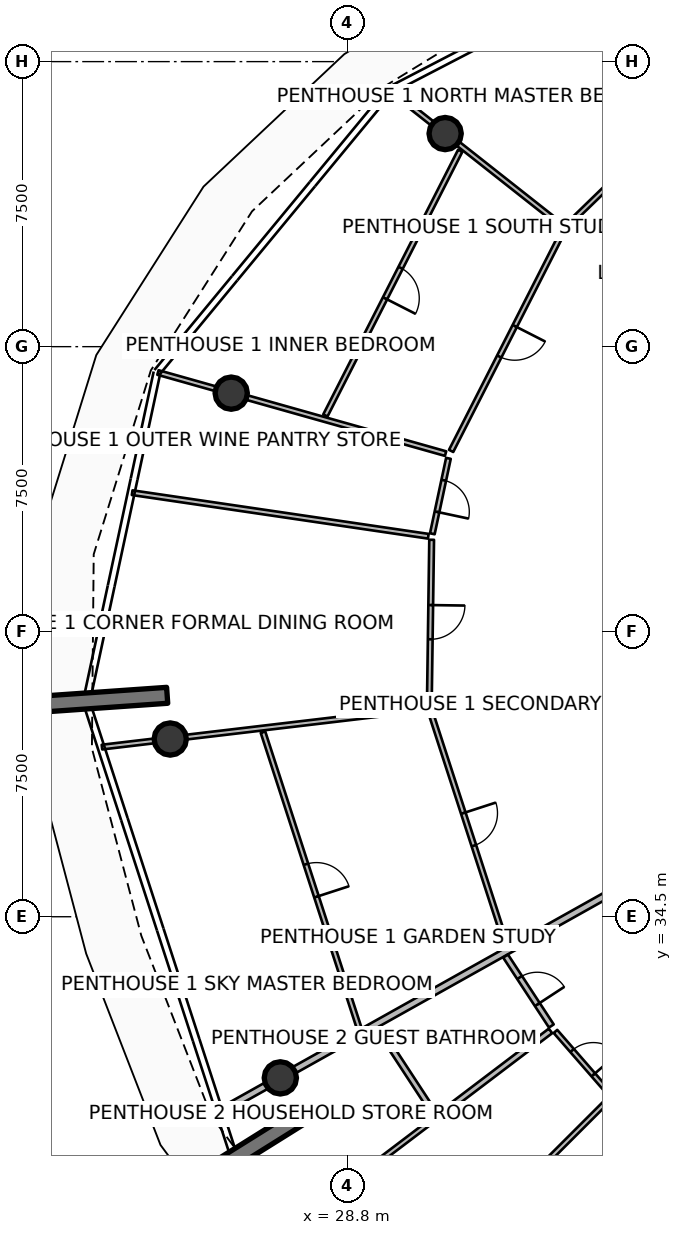
"""IFC4 building model, lengths in metres.
Left out: names, types, materials, properties, quantities, classifications, styles, units other than length and angle.
Written with IfcOpenShell. Run it as: python <this file> out.ifc"""

import sys

from ifc_helpers import new_model, si_unit, direction, frame, frame_2d, origin, origin_2d, place, context, subcontext, project, spatial, rectangle, circle, extrude, element, fill, save


model = new_model("IFC4")
c1 = context("Model", 3, precision=1e-05, world=origin(), true_north=direction((0.0, 1.0)))
c2 = subcontext(c1, "Body", "Model", "MODEL_VIEW")
j1 = project(units=[si_unit("LENGTHUNIT", "METRE"), si_unit("PLANEANGLEUNIT", "RADIAN")], contexts=[c1])
p1 = place(None, origin())
s1 = spatial("IfcSite", under=j1, at=p1, CompositionType="ELEMENT")
p2 = place(p1, origin())
s2 = spatial("IfcBuilding", under=s1, at=p2, CompositionType="ELEMENT")
p3 = place(p2, frame((0.0, 0.0, 313.7)))
s3 = spatial("IfcBuildingStorey", under=s2, at=p3, CompositionType="ELEMENT", Elevation=313.7)
for number, where, z_axis, x_axis in (
    (1, (24.059, 40.326, 0.0), (0.0, 0.0, 1.0), (-0.998, -0.07, 0.0)),
    (2, (27.647, 29.282, 0.0), (0.0, 0.0, 1.0), (-0.848, -0.53, 0.0)),
):
    element("IfcWall", number, at=place(p3, frame(where, z_axis=z_axis, x_axis=x_axis)), inside=s3, PredefinedType="SOLIDWALL", context=c2, shape_type="SweptSolid", body=[
        extrude(rectangle(XDim=3.5, YDim=0.42, at=frame_2d((1.75, 0.0))), origin(), (0.0, 0.0, 1.0), 4.2),
    ])
for number, where, z_axis, x_axis in (
    (3, (31.374, 55.107, 0.0), (0.0, 0.0, 1.0), (1.0, 0.0, 0.0)),
    (4, (25.744, 48.277, 0.0), (0.0, 0.0, 1.0), (1.0, 0.0, 0.0)),
    (5, (24.14, 39.176, 0.0), (0.0, 0.0, 1.0), (1.0, 0.0, 0.0)),
    (6, (27.037, 30.26, 0.0), (0.0, 0.0, 1.0), (1.0, 0.0, 0.0)),
):
    element("IfcColumn", number, at=place(p3, frame(where, z_axis=z_axis, x_axis=x_axis)), inside=s3, PredefinedType="COLUMN", context=c2, shape_type="SweptSolid", body=[
        extrude(circle(Radius=0.425, at=origin_2d()), origin(), (0.0, 0.0, 1.0), 3.94),
    ])
p4 = place(p3, frame((37.204, 35.954, 0.0), z_axis=(0.0, 0.0, 1.0), x_axis=(-0.872495191914, -0.488622697064, 0.0)))
e7 = element("IfcWall", 7, at=p4, inside=s3, PredefinedType="PARTITIONING", context=c2, shape_type="SweptSolid", body=[
    extrude(rectangle(XDim=13.462, YDim=0.18, at=frame_2d((6.731, 0.0))), origin(), (0.0, 0.0, 1.0), 3.38),
])
p5 = place(p3, frame((37.739, 55.87, 0.0), z_axis=(0.0, 0.0, 1.0), x_axis=(-0.594773749171, 0.803893144203, 0.0)))
e8 = element("IfcWall", 8, at=p5, inside=s3, PredefinedType="PARTITIONING", context=c2, shape_type="SweptSolid", body=[
    extrude(rectangle(XDim=3.964, YDim=0.15, at=frame_2d((1.982, 0.0))), origin(), (0.0, 0.0, 1.0), 3.38),
])
p6 = place(p3, frame((37.728, 55.735, 0.0), z_axis=(0.0, 0.0, 1.0), x_axis=(-0.717843655189, -0.696204342636, 0.0)))
e9 = element("IfcWall", 9, at=p6, inside=s3, PredefinedType="PARTITIONING", context=c2, shape_type="SweptSolid", body=[
    extrude(rectangle(XDim=4.366, YDim=0.125, at=frame_2d((2.183, 0.0))), origin(), (0.0, 0.0, 1.0), 3.38),
])
p7 = place(p6, frame((1.733, 0.0, 0.0)))
e10 = element("IfcOpeningElement", 10, at=p7, cuts=e9, PredefinedType="OPENING", context=c2, shape_type="SweptSolid", body=[
    extrude(rectangle(XDim=0.9, YDim=2.08, at=frame_2d((0.45, 1.04))), frame((0.0, 0.073, 0.0), z_axis=(0.0, -1.0, 0.0), x_axis=(1.0, 0.0, 0.0)), (0.0, 0.0, 1.0), 0.145),
])
p8 = place(p3, frame((34.443, 52.688, 0.0), z_axis=(0.0, 0.0, 1.0), x_axis=(-0.785329715116, 0.61907773224, 0.0)))
e11 = element("IfcWall", 11, at=p8, inside=s3, PredefinedType="PARTITIONING", context=c2, shape_type="SweptSolid", body=[
    extrude(rectangle(XDim=5.73, YDim=0.125, at=frame_2d((2.865, 0.0))), origin(), (0.0, 0.0, 1.0), 3.38),
])
p9 = place(p3, frame((34.472, 52.528, 0.0), z_axis=(0.0, 0.0, 1.0), x_axis=(-0.453985634683, -0.891009003042, 0.0)))
e12 = element("IfcWall", 12, at=p9, inside=s3, PredefinedType="PARTITIONING", context=c2, shape_type="SweptSolid", body=[
    extrude(rectangle(XDim=6.477, YDim=0.125, at=frame_2d((3.238, 0.0))), origin(), (0.0, 0.0, 1.0), 3.38),
])
p10 = place(p9, frame((2.788, 0.0, 0.0)))
e13 = element("IfcOpeningElement", 13, at=p10, cuts=e12, PredefinedType="OPENING", context=c2, shape_type="SweptSolid", body=[
    extrude(rectangle(XDim=0.9, YDim=2.08, at=frame_2d((0.45, 1.04))), frame((0.0, 0.073, 0.0), z_axis=(0.0, -1.0, 0.0), x_axis=(1.0, 0.0, 0.0)), (0.0, 0.0, 1.0), 0.145),
])
p11 = place(p3, frame((31.772, 54.656, 0.0), z_axis=(0.0, 0.0, 1.0), x_axis=(-0.453983318952, -0.891010182946, 0.0)))
e14 = element("IfcWall", 14, at=p11, inside=s3, PredefinedType="PARTITIONING", context=c2, shape_type="SweptSolid", body=[
    extrude(rectangle(XDim=7.818, YDim=0.125, at=frame_2d((3.909, 0.0))), origin(), (0.0, 0.0, 1.0), 3.38),
])
p12 = place(p11, frame((3.459, 0.0, 0.0)))
e15 = element("IfcOpeningElement", 15, at=p12, cuts=e14, PredefinedType="OPENING", context=c2, shape_type="SweptSolid", body=[
    extrude(rectangle(XDim=0.9, YDim=2.08, at=frame_2d((0.45, 1.04))), frame((0.0, 0.073, 0.0), z_axis=(0.0, -1.0, 0.0), x_axis=(1.0, 0.0, 0.0)), (0.0, 0.0, 1.0), 0.145),
])
p13 = place(p3, frame((31.385, 46.686, 0.0), z_axis=(0.0, 0.0, 1.0), x_axis=(-0.962456747036, 0.271435093685, 0.0)))
e16 = element("IfcWall", 16, at=p13, inside=s3, PredefinedType="PARTITIONING", context=c2, shape_type="SweptSolid", body=[
    extrude(rectangle(XDim=7.864, YDim=0.125, at=frame_2d((3.932, 0.0))), origin(), (0.0, 0.0, 1.0), 3.38),
])
p14 = place(p3, frame((30.931, 44.511, 0.0), z_axis=(0.0, 0.0, 1.0), x_axis=(-0.989350078836, 0.145555561584, 0.0)))
e17 = element("IfcWall", 17, at=p14, inside=s3, PredefinedType="PARTITIONING", context=c2, shape_type="SweptSolid", body=[
    extrude(rectangle(XDim=7.877, YDim=0.125, at=frame_2d((3.938, 0.0))), origin(), (0.0, 0.0, 1.0), 3.38),
])
p15 = place(p3, frame((31.46, 46.561, 0.0), z_axis=(0.0, 0.0, 1.0), x_axis=(-0.208871695371, -0.977943052981, 0.0)))
e18 = element("IfcWall", 18, at=p15, inside=s3, PredefinedType="PARTITIONING", context=c2, shape_type="SweptSolid", body=[
    extrude(rectangle(XDim=2.029, YDim=0.125, at=frame_2d((1.015, 0.0))), origin(), (0.0, 0.0, 1.0), 3.38),
])
p16 = place(p15, frame((0.59, 0.0, 0.0)))
e19 = element("IfcOpeningElement", 19, at=p16, cuts=e18, PredefinedType="OPENING", context=c2, shape_type="SweptSolid", body=[
    extrude(rectangle(XDim=0.85, YDim=2.06, at=frame_2d((0.425, 1.03))), frame((0.0, 0.073, 0.0), z_axis=(0.0, -1.0, 0.0), x_axis=(1.0, 0.0, 0.0)), (0.0, 0.0, 1.0), 0.145),
])
p17 = place(p3, frame((31.019, 44.418, 0.0), z_axis=(0.0, 0.0, 1.0), x_axis=(-0.014133062898, -0.999900123279, 0.0)))
e20 = element("IfcWall", 20, at=p17, inside=s3, PredefinedType="PARTITIONING", context=c2, shape_type="SweptSolid", body=[
    extrude(rectangle(XDim=4.336, YDim=0.125, at=frame_2d((2.168, 0.0))), origin(), (0.0, 0.0, 1.0), 3.38),
])
p18 = place(p17, frame((1.718, 0.0, 0.0)))
e21 = element("IfcOpeningElement", 21, at=p18, cuts=e20, PredefinedType="OPENING", context=c2, shape_type="SweptSolid", body=[
    extrude(rectangle(XDim=0.9, YDim=2.08, at=frame_2d((0.45, 1.04))), frame((0.0, 0.073, 0.0), z_axis=(0.0, -1.0, 0.0), x_axis=(1.0, 0.0, 0.0)), (0.0, 0.0, 1.0), 0.145),
])
p19 = place(p3, frame((30.857, 39.971, 0.0), z_axis=(0.0, 0.0, 1.0), x_axis=(-0.993069304007, -0.117530240533, 0.0)))
e22 = element("IfcWall", 22, at=p19, inside=s3, PredefinedType="PARTITIONING", context=c2, shape_type="SweptSolid", body=[
    extrude(rectangle(XDim=8.573, YDim=0.125, at=frame_2d((4.286, 0.0))), origin(), (0.0, 0.0, 1.0), 3.38),
])
p20 = place(p3, frame((30.99, 39.878, 0.0), z_axis=(0.0, 0.0, 1.0), x_axis=(0.309026406972, -0.951053457905, 0.0)))
e23 = element("IfcWall", 23, at=p20, inside=s3, PredefinedType="PARTITIONING", context=c2, shape_type="SweptSolid", body=[
    extrude(rectangle(XDim=6.477, YDim=0.125, at=frame_2d((3.238, 0.0))), origin(), (0.0, 0.0, 1.0), 3.38),
])
p21 = place(p20, frame((2.788, 0.0, 0.0)))
e24 = element("IfcOpeningElement", 24, at=p21, cuts=e23, PredefinedType="OPENING", context=c2, shape_type="SweptSolid", body=[
    extrude(rectangle(XDim=0.9, YDim=2.08, at=frame_2d((0.45, 1.04))), frame((0.0, 0.073, 0.0), z_axis=(0.0, -1.0, 0.0), x_axis=(1.0, 0.0, 0.0)), (0.0, 0.0, 1.0), 0.145),
])
p22 = place(p3, frame((26.581, 39.356, 0.0), z_axis=(0.0, 0.0, 1.0), x_axis=(0.309000666789, -0.951061821294, 0.0)))
e25 = element("IfcWall", 25, at=p22, inside=s3, PredefinedType="PARTITIONING", context=c2, shape_type="SweptSolid", body=[
    extrude(rectangle(XDim=8.209, YDim=0.125, at=frame_2d((4.104, 0.0))), origin(), (0.0, 0.0, 1.0), 3.38),
])
p23 = place(p22, frame((3.655, 0.0, 0.0)))
e26 = element("IfcOpeningElement", 26, at=p23, cuts=e25, PredefinedType="OPENING", context=c2, shape_type="SweptSolid", body=[
    extrude(rectangle(XDim=0.9, YDim=2.08, at=frame_2d((0.45, 1.04))), frame((0.0, 0.073, 0.0), z_axis=(0.0, -1.0, 0.0), x_axis=(1.0, 0.0, 0.0)), (0.0, 0.0, 1.0), 0.145),
])
p24 = place(p3, frame((32.964, 33.465, 0.0), z_axis=(0.0, 0.0, 1.0), x_axis=(0.547736904717, -0.836650633903, 0.0)))
e27 = element("IfcWall", 27, at=p24, inside=s3, PredefinedType="PARTITIONING", context=c2, shape_type="SweptSolid", body=[
    extrude(rectangle(XDim=2.199, YDim=0.15, at=frame_2d((1.099, 0.0))), origin(), (0.0, 0.0, 1.0), 3.38),
])
p25 = place(p24, frame((0.674, 0.0, 0.0)))
e28 = element("IfcOpeningElement", 28, at=p25, cuts=e27, PredefinedType="OPENING", context=c2, shape_type="SweptSolid", body=[
    extrude(rectangle(XDim=0.85, YDim=2.06, at=frame_2d((0.425, 1.03))), frame((0.0, 0.085, 0.0), z_axis=(0.0, -1.0, 0.0), x_axis=(1.0, 0.0, 0.0)), (0.0, 0.0, 1.0), 0.17),
])
p26 = place(p3, frame((29.605, 31.584, 0.0), z_axis=(0.0, 0.0, 1.0), x_axis=(0.547706970619, -0.836670230339, 0.0)))
e29 = element("IfcWall", 29, at=p26, inside=s3, PredefinedType="PARTITIONING", context=c2, shape_type="SweptSolid", body=[
    extrude(rectangle(XDim=2.731, YDim=0.15, at=frame_2d((1.365, 0.0))), origin(), (0.0, 0.0, 1.0), 3.38),
])
p27 = place(p3, frame((34.146, 31.496, 0.0), z_axis=(0.0, 0.0, 1.0), x_axis=(-0.796862333182, -0.60416092389, 0.0)))
e30 = element("IfcWall", 30, at=p27, inside=s3, PredefinedType="PARTITIONING", context=c2, shape_type="SweptSolid", body=[
    extrude(rectangle(XDim=3.72, YDim=0.15, at=frame_2d((1.86, 0.0))), origin(), (0.0, 0.0, 1.0), 3.38),
])
p28 = place(p3, frame((31.078, 29.17, 0.0), z_axis=(0.0, 0.0, 1.0), x_axis=(-0.796851341582, -0.604175421064, 0.0)))
e31 = element("IfcWall", 31, at=p28, inside=s3, PredefinedType="PARTITIONING", context=c2, shape_type="SweptSolid", body=[
    extrude(rectangle(XDim=4.304, YDim=0.125, at=frame_2d((2.152, 0.0))), origin(), (0.0, 0.0, 1.0), 3.38),
])
p29 = place(p28, frame((1.727, 0.0, 0.0)))
e32 = element("IfcOpeningElement", 32, at=p29, cuts=e31, PredefinedType="OPENING", context=c2, shape_type="SweptSolid", body=[
    extrude(rectangle(XDim=0.85, YDim=2.06, at=frame_2d((0.425, 1.03))), frame((0.0, 0.073, 0.0), z_axis=(0.0, -1.0, 0.0), x_axis=(1.0, 0.0, 0.0)), (0.0, 0.0, 1.0), 0.145),
])
p30 = place(p3, frame((35.7, 29.713, 0.0), z_axis=(0.0, 0.0, 1.0), x_axis=(-0.707470011435, -0.706743364256, 0.0)))
e33 = element("IfcWall", 33, at=p30, inside=s3, PredefinedType="PARTITIONING", context=c2, shape_type="SweptSolid", body=[
    extrude(rectangle(XDim=7.728, YDim=0.125, at=frame_2d((3.864, 0.0))), origin(), (0.0, 0.0, 1.0), 3.38),
])
p31 = place(p3, frame((34.277, 31.482, 0.0), z_axis=(0.0, 0.0, 1.0), x_axis=(0.656959210167, -0.753926121167, 0.0)))
e34 = element("IfcWall", 34, at=p31, inside=s3, PredefinedType="PARTITIONING", context=c2, shape_type="SweptSolid", body=[
    extrude(rectangle(XDim=2.183, YDim=0.125, at=frame_2d((1.091, 0.0))), origin(), (0.0, 0.0, 1.0), 3.38),
])
p32 = place(p31, frame((0.667, 0.0, 0.0)))
e35 = element("IfcOpeningElement", 35, at=p32, cuts=e34, PredefinedType="OPENING", context=c2, shape_type="SweptSolid", body=[
    extrude(rectangle(XDim=0.85, YDim=2.06, at=frame_2d((0.425, 1.03))), frame((0.0, 0.073, 0.0), z_axis=(0.0, -1.0, 0.0), x_axis=(1.0, 0.0, 0.0)), (0.0, 0.0, 1.0), 0.145),
])
p33 = place(p3, frame((37.23, 28.339, 0.0), z_axis=(0.0, 0.0, 1.0), x_axis=(-0.619087123863, -0.785322311581, 0.0)))
e36 = element("IfcWall", 36, at=p33, inside=s3, PredefinedType="PARTITIONING", context=c2, shape_type="SweptSolid", body=[
    extrude(rectangle(XDim=7.731, YDim=0.125, at=frame_2d((3.865, 0.0))), origin(), (0.0, 0.0, 1.0), 3.38),
])
p34 = place(p10, origin())
e37 = element("IfcDoor", 37, at=p34, inside=s3, OperationType="SINGLE_SWING_LEFT", PredefinedType="DOOR", context=c2, shape_type="SweptSolid", body=[
    extrude(rectangle(XDim=0.9, YDim=2.08, at=frame_2d((0.45, 1.04))), frame((0.0, 0.025, 0.0), z_axis=(0.0, -1.0, 0.0), x_axis=(1.0, 0.0, 0.0)), (0.0, 0.0, 1.0), 0.05),
])
fill(e13, e37)
p35 = place(p12, origin())
e38 = element("IfcDoor", 38, at=p35, inside=s3, OperationType="SINGLE_SWING_RIGHT", PredefinedType="DOOR", context=c2, shape_type="SweptSolid", body=[
    extrude(rectangle(XDim=0.9, YDim=2.08, at=frame_2d((0.45, 1.04))), frame((0.0, 0.025, 0.0), z_axis=(0.0, -1.0, 0.0), x_axis=(1.0, 0.0, 0.0)), (0.0, 0.0, 1.0), 0.05),
])
fill(e15, e38)
p36 = place(p16, origin())
e39 = element("IfcDoor", 39, at=p36, inside=s3, OperationType="SINGLE_SWING_RIGHT", PredefinedType="DOOR", context=c2, shape_type="SweptSolid", body=[
    extrude(rectangle(XDim=0.85, YDim=2.06, at=frame_2d((0.425, 1.03))), frame((0.0, 0.025, 0.0), z_axis=(0.0, -1.0, 0.0), x_axis=(1.0, 0.0, 0.0)), (0.0, 0.0, 1.0), 0.05),
])
fill(e19, e39)
p37 = place(p18, origin())
e40 = element("IfcDoor", 40, at=p37, inside=s3, OperationType="SINGLE_SWING_LEFT", PredefinedType="DOOR", context=c2, shape_type="SweptSolid", body=[
    extrude(rectangle(XDim=0.9, YDim=2.08, at=frame_2d((0.45, 1.04))), frame((0.0, 0.025, 0.0), z_axis=(0.0, -1.0, 0.0), x_axis=(1.0, 0.0, 0.0)), (0.0, 0.0, 1.0), 0.05),
])
fill(e21, e40)
p38 = place(p21, origin())
e41 = element("IfcDoor", 41, at=p38, inside=s3, OperationType="SINGLE_SWING_LEFT", PredefinedType="DOOR", context=c2, shape_type="SweptSolid", body=[
    extrude(rectangle(XDim=0.9, YDim=2.08, at=frame_2d((0.45, 1.04))), frame((0.0, 0.025, 0.0), z_axis=(0.0, -1.0, 0.0), x_axis=(1.0, 0.0, 0.0)), (0.0, 0.0, 1.0), 0.05),
])
fill(e24, e41)
p39 = place(p23, origin())
e42 = element("IfcDoor", 42, at=p39, inside=s3, OperationType="SINGLE_SWING_RIGHT", PredefinedType="DOOR", context=c2, shape_type="SweptSolid", body=[
    extrude(rectangle(XDim=0.9, YDim=2.08, at=frame_2d((0.45, 1.04))), frame((0.0, 0.025, 0.0), z_axis=(0.0, -1.0, 0.0), x_axis=(1.0, 0.0, 0.0)), (0.0, 0.0, 1.0), 0.05),
])
fill(e26, e42)
p40 = place(p25, origin())
e43 = element("IfcDoor", 43, at=p40, inside=s3, OperationType="SINGLE_SWING_RIGHT", PredefinedType="DOOR", context=c2, shape_type="SweptSolid", body=[
    extrude(rectangle(XDim=0.85, YDim=2.06, at=frame_2d((0.425, 1.03))), frame((0.0, 0.025, 0.0), z_axis=(0.0, -1.0, 0.0), x_axis=(1.0, 0.0, 0.0)), (0.0, 0.0, 1.0), 0.05),
])
fill(e28, e43)
p41 = place(p32, origin())
e44 = element("IfcDoor", 44, at=p41, inside=s3, OperationType="SINGLE_SWING_RIGHT", PredefinedType="DOOR", context=c2, shape_type="SweptSolid", body=[
    extrude(rectangle(XDim=0.85, YDim=2.06, at=frame_2d((0.425, 1.03))), frame((0.0, 0.025, 0.0), z_axis=(0.0, -1.0, 0.0), x_axis=(1.0, 0.0, 0.0)), (0.0, 0.0, 1.0), 0.05),
])
fill(e35, e44)
save(model, sys.argv[1])
